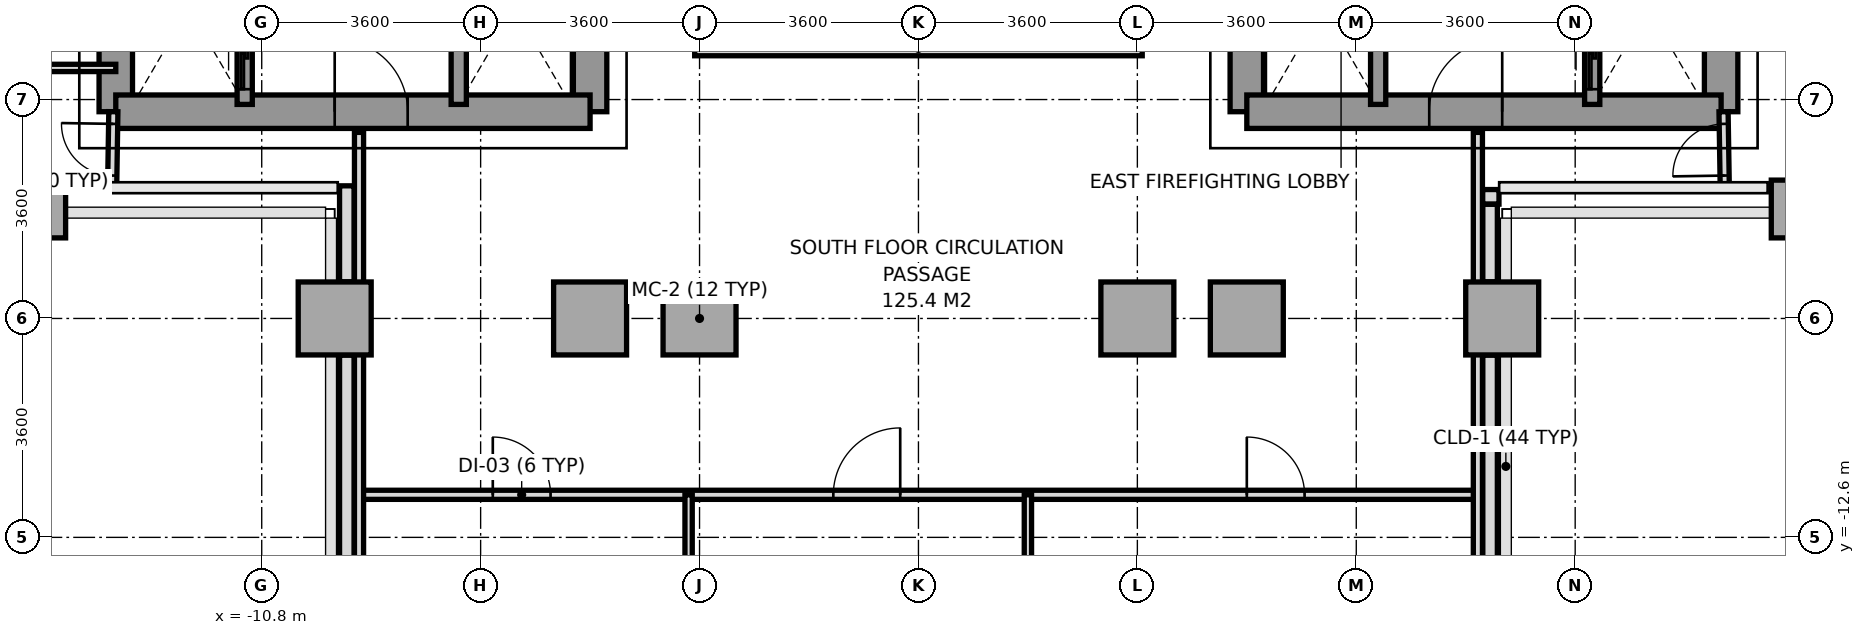
"""IFC4 building model, lengths in metres.
Left out: names, types, materials, properties, quantities, classifications, styles, units other than length and angle.
Written with IfcOpenShell. Run it as: python <this file> out.ifc"""

import sys

from ifc_helpers import new_model, si_unit, direction, frame, frame_2d, origin, origin_2d, place, context, subcontext, project, spatial, rectangle, extrude, source, transform, mapped, element, fill, save


model = new_model("IFC4")
c1 = context("Model", 3, precision=1e-05, world=origin(), true_north=direction((0.0, 1.0)))
c2 = subcontext(c1, "Body", "Model", "MODEL_VIEW")
j1 = project(units=[si_unit("LENGTHUNIT", "METRE"), si_unit("PLANEANGLEUNIT", "RADIAN")], contexts=[c1])
p1 = place(None, origin())
s1 = spatial("IfcSite", under=j1, at=p1, CompositionType="ELEMENT")
p2 = place(p1, origin())
s2 = spatial("IfcBuilding", under=s1, at=p2, CompositionType="ELEMENT")
p3 = place(p2, frame((0.0, 0.0, 57.8)))
s3 = spatial("IfcBuildingStorey", under=s2, at=p3, CompositionType="ELEMENT", Elevation=57.8)
m1 = source(origin(), c2, "Body", "SweptSolid", [
    extrude(rectangle(XDim=0.75, YDim=0.95, at=origin_2d()), origin(), (0.0, 0.0, 1.0), 3.2),
])
p4 = place(p3, frame((-14.4, -7.2, 0.0), z_axis=(0.0, 0.0, 1.0), x_axis=(1.0, 0.0, 0.0)))
e1 = element("IfcColumn", 1, at=p4, inside=s3, PredefinedType="COLUMN", context=c2, shape_type="MappedRepresentation", body=[
    mapped(m1, transform((0.0, 0.0, 0.0), x_axis=(1.0, 0.0, 0.0), y_axis=(0.0, 1.0, 0.0), z_axis=(0.0, 0.0, 1.0), scale=1.0)),
])
m2 = source(origin(), c2, "Body", "SweptSolid", [
    extrude(rectangle(XDim=1.2, YDim=1.2, at=origin_2d()), origin(), (0.0, 0.0, 1.0), 3.2),
])
for number, where, z_axis, x_axis in (
    (2, (-9.6, -9.0, 0.0), (0.0, 0.0, 1.0), (1.0, 0.0, 0.0)),
    (3, (-5.4, -9.0, 0.0), (0.0, 0.0, 1.0), (1.0, 0.0, 0.0)),
    (4, (-3.6, -9.0, 0.0), (0.0, 0.0, 1.0), (1.0, 0.0, 0.0)),
    (5, (3.6, -9.0, 0.0), (0.0, 0.0, 1.0), (1.0, 0.0, 0.0)),
    (6, (5.4, -9.0, 0.0), (0.0, 0.0, 1.0), (1.0, 0.0, 0.0)),
    (7, (9.6, -9.0, 0.0), (0.0, 0.0, 1.0), (1.0, 0.0, 0.0)),
):
    element("IfcColumn", number, at=place(p3, frame(where, z_axis=z_axis, x_axis=x_axis)), inside=s3, PredefinedType="COLUMN", context=c2, shape_type="MappedRepresentation", body=[
        mapped(m2, transform((0.0, 0.0, 0.0), x_axis=(1.0, 0.0, 0.0), y_axis=(0.0, 1.0, 0.0), z_axis=(0.0, 0.0, 1.0), scale=1.0)),
    ])
p5 = place(p3, frame((14.4, -7.2, 0.0), z_axis=(0.0, 0.0, 1.0), x_axis=(1.0, 0.0, 0.0)))
e8 = element("IfcColumn", 8, at=p5, inside=s3, PredefinedType="COLUMN", context=c2, shape_type="MappedRepresentation", body=[
    mapped(m1, transform((0.0, 0.0, 0.0), x_axis=(1.0, 0.0, 0.0), y_axis=(0.0, 1.0, 0.0), z_axis=(0.0, 0.0, 1.0), scale=1.0)),
])
p6 = place(p3, frame((9.547, -7.0, 0.0), z_axis=(0.0, 0.0, 1.0), x_axis=(-1.0, 0.0, 0.0)))
e9 = element("IfcWall", 9, at=p6, inside=s3, PredefinedType="PARAPET", context=c2, shape_type="SweptSolid", body=[
    extrude(rectangle(XDim=0.269, YDim=0.24, at=frame_2d((0.135, 0.0))), origin(), (0.0, 0.0, 1.0), 1.15),
])
p7 = place(p3, frame((9.4, -7.123, 0.0), z_axis=(0.0, 0.0, 1.0), x_axis=(0.0, -1.0, 0.0)))
e10 = element("IfcWall", 10, at=p7, inside=s3, PredefinedType="PARAPET", context=c2, shape_type="SweptSolid", body=[
    extrude(rectangle(XDim=1.274, YDim=0.24, at=frame_2d((0.637, 0.0))), origin(), (0.0, 0.0, 1.0), 1.15),
])
p8 = place(p3, frame((9.4, -9.603, 0.0), z_axis=(0.0, 0.0, 1.0), x_axis=(0.0, -1.0, 0.0)))
e11 = element("IfcWall", 11, at=p8, inside=s3, PredefinedType="PARAPET", context=c2, shape_type="SweptSolid", body=[
    extrude(rectangle(XDim=6.0, YDim=0.24, at=frame_2d((3.0, 0.0))), origin(), (0.0, 0.0, 1.0), 1.15),
])
p9 = place(p3, frame((-9.4, -15.358, 0.0), z_axis=(0.0, 0.0, 1.0), x_axis=(0.0, 1.0, 0.0)))
e12 = element("IfcWall", 12, at=p9, inside=s3, PredefinedType="PARAPET", context=c2, shape_type="SweptSolid", body=[
    extrude(rectangle(XDim=5.755, YDim=0.24, at=frame_2d((2.877, 0.0))), origin(), (0.0, 0.0, 1.0), 1.15),
])
p10 = place(p3, frame((-9.4, -8.397, 0.0), z_axis=(0.0, 0.0, 1.0), x_axis=(0.0, 1.0, 0.0)))
e13 = element("IfcWall", 13, at=p10, inside=s3, PredefinedType="PARAPET", context=c2, shape_type="SweptSolid", body=[
    extrude(rectangle(XDim=1.578, YDim=0.24, at=frame_2d((0.789, 0.0))), origin(), (0.0, 0.0, 1.0), 1.15),
])
p11 = place(p3, frame((-13.2, -5.6, 0.0), z_axis=(0.0, 0.0, 1.0), x_axis=(0.0, 1.0, 0.0)))
e14 = element("IfcWall", 14, at=p11, inside=s3, PredefinedType="SHEAR", context=c2, shape_type="SweptSolid", body=[
    extrude(rectangle(XDim=11.2, YDim=0.55, at=frame_2d((5.6, 0.0))), origin(), (0.0, 0.0, 1.0), 3.2),
])
p12 = place(p3, frame((-5.4, -5.6, 0.0), z_axis=(0.0, 0.0, 1.0), x_axis=(0.0, 1.0, 0.0)))
e15 = element("IfcWall", 15, at=p12, inside=s3, PredefinedType="SHEAR", context=c2, shape_type="SweptSolid", body=[
    extrude(rectangle(XDim=12.5, YDim=0.55, at=frame_2d((6.25, 0.0))), origin(), (0.0, 0.0, 1.0), 3.2),
])
p13 = place(p12, frame((4.55, 0.0, 0.0)))
e16 = element("IfcOpeningElement", 16, at=p13, cuts=e15, PredefinedType="OPENING", context=c2, shape_type="SweptSolid", body=[
    extrude(rectangle(XDim=1.2, YDim=2.2, at=frame_2d((0.6, 1.1))), frame((0.0, 0.285, 0.0), z_axis=(0.0, -1.0, 0.0), x_axis=(1.0, 0.0, 0.0)), (0.0, 0.0, 1.0), 0.57),
])
p14 = place(p12, frame((6.86, 0.0, 0.0)))
e17 = element("IfcOpeningElement", 17, at=p14, cuts=e15, PredefinedType="OPENING", context=c2, shape_type="SweptSolid", body=[
    extrude(rectangle(XDim=0.8, YDim=2.1, at=frame_2d((0.4, 1.05))), frame((0.0, 0.285, 0.0), z_axis=(0.0, -1.0, 0.0), x_axis=(1.0, 0.0, 0.0)), (0.0, 0.0, 1.0), 0.57),
])
p15 = place(p3, frame((-13.2, -5.6, 0.0), z_axis=(0.0, 0.0, 1.0), x_axis=(1.0, 0.0, 0.0)))
e18 = element("IfcWall", 18, at=p15, inside=s3, PredefinedType="SHEAR", context=c2, shape_type="SweptSolid", body=[
    extrude(rectangle(XDim=7.8, YDim=0.55, at=frame_2d((3.9, 0.0))), origin(), (0.0, 0.0, 1.0), 3.2),
])
p16 = place(p15, frame((3.6, 0.0, 0.0)))
e19 = element("IfcOpeningElement", 19, at=p16, cuts=e18, PredefinedType="OPENING", context=c2, shape_type="SweptSolid", body=[
    extrude(rectangle(XDim=1.2, YDim=2.2, at=frame_2d((0.6, 1.1))), frame((0.0, 0.285, 0.0), z_axis=(0.0, -1.0, 0.0), x_axis=(1.0, 0.0, 0.0)), (0.0, 0.0, 1.0), 0.57),
])
p17 = place(p3, frame((13.2, -5.6, 0.0), z_axis=(0.0, 0.0, 1.0), x_axis=(0.0, 1.0, 0.0)))
e20 = element("IfcWall", 20, at=p17, inside=s3, PredefinedType="SHEAR", context=c2, shape_type="SweptSolid", body=[
    extrude(rectangle(XDim=11.2, YDim=0.55, at=frame_2d((5.6, 0.0))), origin(), (0.0, 0.0, 1.0), 3.2),
])
p18 = place(p3, frame((5.4, -5.6, 0.0), z_axis=(0.0, 0.0, 1.0), x_axis=(0.0, 1.0, 0.0)))
e21 = element("IfcWall", 21, at=p18, inside=s3, PredefinedType="SHEAR", context=c2, shape_type="SweptSolid", body=[
    extrude(rectangle(XDim=12.5, YDim=0.55, at=frame_2d((6.25, 0.0))), origin(), (0.0, 0.0, 1.0), 3.2),
])
p19 = place(p18, frame((4.55, 0.0, 0.0)))
e22 = element("IfcOpeningElement", 22, at=p19, cuts=e21, PredefinedType="OPENING", context=c2, shape_type="SweptSolid", body=[
    extrude(rectangle(XDim=1.2, YDim=2.2, at=frame_2d((0.6, 1.1))), frame((0.0, 0.285, 0.0), z_axis=(0.0, -1.0, 0.0), x_axis=(1.0, 0.0, 0.0)), (0.0, 0.0, 1.0), 0.57),
])
p20 = place(p18, frame((6.86, 0.0, 0.0)))
e23 = element("IfcOpeningElement", 23, at=p20, cuts=e21, PredefinedType="OPENING", context=c2, shape_type="SweptSolid", body=[
    extrude(rectangle(XDim=0.8, YDim=2.1, at=frame_2d((0.4, 1.05))), frame((0.0, 0.285, 0.0), z_axis=(0.0, -1.0, 0.0), x_axis=(1.0, 0.0, 0.0)), (0.0, 0.0, 1.0), 0.57),
])
p21 = place(p18, frame((7.88, 0.0, 0.0)))
e24 = element("IfcOpeningElement", 24, at=p21, cuts=e21, PredefinedType="OPENING", context=c2, shape_type="SweptSolid", body=[
    extrude(rectangle(XDim=0.8, YDim=2.1, at=frame_2d((0.4, 1.05))), frame((0.0, 0.285, 0.0), z_axis=(0.0, -1.0, 0.0), x_axis=(1.0, 0.0, 0.0)), (0.0, 0.0, 1.0), 0.57),
])
p22 = place(p3, frame((5.4, -5.6, 0.0), z_axis=(0.0, 0.0, 1.0), x_axis=(1.0, 0.0, 0.0)))
e25 = element("IfcWall", 25, at=p22, inside=s3, PredefinedType="SHEAR", context=c2, shape_type="SweptSolid", body=[
    extrude(rectangle(XDim=7.8, YDim=0.55, at=frame_2d((3.9, 0.0))), origin(), (0.0, 0.0, 1.0), 3.2),
])
p23 = place(p22, frame((3.0, 0.0, 0.0)))
e26 = element("IfcOpeningElement", 26, at=p23, cuts=e25, PredefinedType="OPENING", context=c2, shape_type="SweptSolid", body=[
    extrude(rectangle(XDim=1.2, YDim=2.2, at=frame_2d((0.6, 1.1))), frame((0.0, 0.285, 0.0), z_axis=(0.0, -1.0, 0.0), x_axis=(1.0, 0.0, 0.0)), (0.0, 0.0, 1.0), 0.57),
])
p24 = place(p3, frame((-11.08, -5.48, 0.0), z_axis=(0.0, 0.0, 1.0), x_axis=(0.0, 1.0, 0.0)))
e27 = element("IfcWall", 27, at=p24, inside=s3, PredefinedType="SOLIDWALL", context=c2, shape_type="SweptSolid", body=[
    extrude(rectangle(XDim=1.6, YDim=0.25, at=frame_2d((0.8, 0.0))), origin(), (0.0, 0.0, 1.0), 3.2),
])
p25 = place(p24, frame((0.25, 0.0, 0.0)))
e28 = element("IfcOpeningElement", 28, at=p25, cuts=e27, PredefinedType="OPENING", context=c2, shape_type="SweptSolid", body=[
    extrude(rectangle(XDim=1.1, YDim=2.2, at=frame_2d((0.55, 1.1))), frame((0.0, 0.135, 0.0), z_axis=(0.0, -1.0, 0.0), x_axis=(1.0, 0.0, 0.0)), (0.0, 0.0, 1.0), 0.27),
])
p26 = place(p3, frame((11.08, -5.48, 0.0), z_axis=(0.0, 0.0, 1.0), x_axis=(0.0, 1.0, 0.0)))
e29 = element("IfcWall", 29, at=p26, inside=s3, PredefinedType="SOLIDWALL", context=c2, shape_type="SweptSolid", body=[
    extrude(rectangle(XDim=1.6, YDim=0.25, at=frame_2d((0.8, 0.0))), origin(), (0.0, 0.0, 1.0), 3.2),
])
p27 = place(p26, frame((0.25, 0.0, 0.0)))
e30 = element("IfcOpeningElement", 30, at=p27, cuts=e29, PredefinedType="OPENING", context=c2, shape_type="SweptSolid", body=[
    extrude(rectangle(XDim=1.1, YDim=2.2, at=frame_2d((0.55, 1.1))), frame((0.0, 0.135, 0.0), z_axis=(0.0, -1.0, 0.0), x_axis=(1.0, 0.0, 0.0)), (0.0, 0.0, 1.0), 0.27),
])
for number, where, z_axis, x_axis in (
    (31, (-7.56, -5.48, 0.0), (0.0, 0.0, 1.0), (0.0, 1.0, 0.0)),
    (32, (7.56, -5.48, 0.0), (0.0, 0.0, 1.0), (0.0, 1.0, 0.0)),
):
    element("IfcWall", number, at=place(p3, frame(where, z_axis=z_axis, x_axis=x_axis)), inside=s3, PredefinedType="SOLIDWALL", context=c2, shape_type="SweptSolid", body=[
        extrude(rectangle(XDim=1.6, YDim=0.25, at=frame_2d((0.8, 0.0))), origin(), (0.0, 0.0, 1.0), 3.2),
    ])
p28 = place(p3, frame((-9.2, -11.9, 0.0), z_axis=(0.0, 0.0, 1.0), x_axis=(1.0, 0.0, 0.0)))
e33 = element("IfcWall", 33, at=p28, inside=s3, PredefinedType="PARTITIONING", context=c2, shape_type="SweptSolid", body=[
    extrude(rectangle(XDim=18.4, YDim=0.15, at=frame_2d((9.2, 0.0))), origin(), (0.0, 0.0, 1.0), 3.2),
])
p29 = place(p28, frame((2.2, 0.0, 0.0)))
e34 = element("IfcOpeningElement", 34, at=p29, cuts=e33, PredefinedType="OPENING", context=c2, shape_type="SweptSolid", body=[
    extrude(rectangle(XDim=0.95, YDim=2.15, at=frame_2d((0.475, 1.075))), frame((0.0, 0.085, 0.0), z_axis=(0.0, -1.0, 0.0), x_axis=(1.0, 0.0, 0.0)), (0.0, 0.0, 1.0), 0.17),
])
p30 = place(p28, frame((7.8, 0.0, 0.0)))
e35 = element("IfcOpeningElement", 35, at=p30, cuts=e33, PredefinedType="OPENING", context=c2, shape_type="SweptSolid", body=[
    extrude(rectangle(XDim=1.1, YDim=2.2, at=frame_2d((0.55, 1.1))), frame((0.0, 0.085, 0.0), z_axis=(0.0, -1.0, 0.0), x_axis=(1.0, 0.0, 0.0)), (0.0, 0.0, 1.0), 0.17),
])
p31 = place(p28, frame((14.6, 0.0, 0.0)))
e36 = element("IfcOpeningElement", 36, at=p31, cuts=e33, PredefinedType="OPENING", context=c2, shape_type="SweptSolid", body=[
    extrude(rectangle(XDim=0.95, YDim=2.15, at=frame_2d((0.475, 1.075))), frame((0.0, 0.085, 0.0), z_axis=(0.0, -1.0, 0.0), x_axis=(1.0, 0.0, 0.0)), (0.0, 0.0, 1.0), 0.17),
])
for number, where, z_axis, x_axis in (
    (37, (-9.2, -15.68, 0.0), (0.0, 0.0, 1.0), (0.0, 1.0, 0.0)),
    (38, (9.2, -15.68, 0.0), (0.0, 0.0, 1.0), (0.0, 1.0, 0.0)),
):
    element("IfcWall", number, at=place(p3, frame(where, z_axis=z_axis, x_axis=x_axis)), inside=s3, PredefinedType="PARTITIONING", context=c2, shape_type="SweptSolid", body=[
        extrude(rectangle(XDim=9.74, YDim=0.15, at=frame_2d((4.87, 0.0))), origin(), (0.0, 0.0, 1.0), 2.65),
    ])
for number, where, z_axis, x_axis in (
    (39, (-3.78, -24.65, 0.0), (0.0, 0.0, 1.0), (0.0, 1.0, 0.0)),
    (40, (1.8, -24.65, 0.0), (0.0, 0.0, 1.0), (0.0, 1.0, 0.0)),
):
    element("IfcWall", number, at=place(p3, frame(where, z_axis=z_axis, x_axis=x_axis)), inside=s3, PredefinedType="PARTITIONING", context=c2, shape_type="SweptSolid", body=[
        extrude(rectangle(XDim=12.75, YDim=0.12, at=frame_2d((6.375, 0.0))), origin(), (0.0, 0.0, 1.0), 2.65),
    ])
p32 = place(p3, frame((-13.26, -6.85, 0.0), z_axis=(0.0, 0.0, 1.0), x_axis=(0.016013571389, 0.999871774545, 0.0)))
e41 = element("IfcWall", 41, at=p32, inside=s3, PredefinedType="PARTITIONING", context=c2, shape_type="SweptSolid", body=[
    extrude(rectangle(XDim=1.25, YDim=0.15, at=frame_2d((0.625, 0.0))), origin(), (0.0, 0.0, 1.0), 3.2),
])
p33 = place(p32, frame((0.2, 0.0, 0.0)))
e42 = element("IfcOpeningElement", 42, at=p33, cuts=e41, PredefinedType="OPENING", context=c2, shape_type="SweptSolid", body=[
    extrude(rectangle(XDim=0.85, YDim=2.1, at=frame_2d((0.425, 1.05))), frame((0.0, 0.085, 0.0), z_axis=(0.0, -1.0, 0.0), x_axis=(1.0, 0.0, 0.0)), (0.0, 0.0, 1.0), 0.17),
])
p34 = place(p3, frame((-24.57, -4.88, 0.0), z_axis=(0.0, 0.0, 1.0), x_axis=(1.0, 0.0, 0.0)))
e43 = element("IfcWall", 43, at=p34, inside=s3, PredefinedType="PARTITIONING", context=c2, shape_type="SweptSolid", body=[
    extrude(rectangle(XDim=11.37, YDim=0.12, at=frame_2d((5.685, 0.0))), origin(), (0.0, 0.0, 1.0), 2.7),
])
p35 = place(p34, frame((2.2, 0.0, 0.0)))
e44 = element("IfcOpeningElement", 44, at=p35, cuts=e43, PredefinedType="OPENING", context=c2, shape_type="SweptSolid", body=[
    extrude(rectangle(XDim=0.95, YDim=2.15, at=frame_2d((0.475, 1.075))), frame((0.0, 0.07, 0.0), z_axis=(0.0, -1.0, 0.0), x_axis=(1.0, 0.0, 0.0)), (0.0, 0.0, 1.0), 0.14),
])
p36 = place(p3, frame((13.26, -6.85, 0.0), z_axis=(0.0, 0.0, 1.0), x_axis=(-0.016013571389, 0.999871774545, 0.0)))
e45 = element("IfcWall", 45, at=p36, inside=s3, PredefinedType="PARTITIONING", context=c2, shape_type="SweptSolid", body=[
    extrude(rectangle(XDim=1.25, YDim=0.15, at=frame_2d((0.625, 0.0))), origin(), (0.0, 0.0, 1.0), 3.2),
])
p37 = place(p36, frame((0.2, 0.0, 0.0)))
e46 = element("IfcOpeningElement", 46, at=p37, cuts=e45, PredefinedType="OPENING", context=c2, shape_type="SweptSolid", body=[
    extrude(rectangle(XDim=0.85, YDim=2.1, at=frame_2d((0.425, 1.05))), frame((0.0, 0.085, 0.0), z_axis=(0.0, -1.0, 0.0), x_axis=(1.0, 0.0, 0.0)), (0.0, 0.0, 1.0), 0.17),
])
p38 = place(p3, frame((-3.68, -4.56, 0.0), z_axis=(0.0, 0.0, 1.0), x_axis=(1.0, 0.0, 0.0)))
e47 = element("IfcWall", 47, at=p38, inside=s3, PredefinedType="PARAPET", context=c2, shape_type="SweptSolid", body=[
    extrude(rectangle(XDim=7.36, YDim=0.24, at=frame_2d((3.68, 0.0))), origin(), (0.0, 0.0, 1.0), 1.15),
])
m3 = source(origin(), c2, "Body", "SweptSolid", [
    extrude(rectangle(XDim=1.2, YDim=2.2, at=frame_2d((0.6, 1.1))), frame((0.0, 0.025, 0.0), z_axis=(0.0, -1.0, 0.0), x_axis=(1.0, 0.0, 0.0)), (0.0, 0.0, 1.0), 0.05),
])
p39 = place(p16, origin())
e48 = element("IfcDoor", 48, at=p39, inside=s3, OperationType="SINGLE_SWING_LEFT", PredefinedType="DOOR", context=c2, shape_type="MappedRepresentation", body=[
    mapped(m3, transform((0.0, 0.0, 0.0), x_axis=(1.0, 0.0, 0.0), y_axis=(0.0, 1.0, 0.0), z_axis=(0.0, 0.0, 1.0), scale=1.0)),
])
fill(e19, e48)
p40 = place(p23, origin())
e49 = element("IfcDoor", 49, at=p40, inside=s3, OperationType="SINGLE_SWING_RIGHT", PredefinedType="DOOR", context=c2, shape_type="MappedRepresentation", body=[
    mapped(m3, transform((0.0, 0.0, 0.0), x_axis=(1.0, 0.0, 0.0), y_axis=(0.0, 1.0, 0.0), z_axis=(0.0, 0.0, 1.0), scale=1.0)),
])
fill(e26, e49)
m4 = source(origin(), c2, "Body", "SweptSolid", [
    extrude(rectangle(XDim=1.1, YDim=2.2, at=frame_2d((0.55, 1.1))), frame((0.0, 0.025, 0.0), z_axis=(0.0, -1.0, 0.0), x_axis=(1.0, 0.0, 0.0)), (0.0, 0.0, 1.0), 0.05),
])
p41 = place(p25, origin())
e50 = element("IfcDoor", 50, at=p41, inside=s3, OperationType="SLIDING_TO_LEFT", PredefinedType="DOOR", context=c2, shape_type="MappedRepresentation", body=[
    mapped(m4, transform((0.0, 0.0, 0.0), x_axis=(1.0, 0.0, 0.0), y_axis=(0.0, 1.0, 0.0), z_axis=(0.0, 0.0, 1.0), scale=1.0)),
])
fill(e28, e50)
p42 = place(p27, origin())
e51 = element("IfcDoor", 51, at=p42, inside=s3, OperationType="SLIDING_TO_LEFT", PredefinedType="DOOR", context=c2, shape_type="MappedRepresentation", body=[
    mapped(m4, transform((0.0, 0.0, 0.0), x_axis=(1.0, 0.0, 0.0), y_axis=(0.0, 1.0, 0.0), z_axis=(0.0, 0.0, 1.0), scale=1.0)),
])
fill(e30, e51)
m5 = source(origin(), c2, "Body", "SweptSolid", [
    extrude(rectangle(XDim=0.95, YDim=2.15, at=frame_2d((0.475, 1.075))), frame((0.0, 0.025, 0.0), z_axis=(0.0, -1.0, 0.0), x_axis=(1.0, 0.0, 0.0)), (0.0, 0.0, 1.0), 0.05),
])
p43 = place(p29, origin())
e52 = element("IfcDoor", 52, at=p43, inside=s3, OperationType="SINGLE_SWING_LEFT", PredefinedType="DOOR", context=c2, shape_type="MappedRepresentation", body=[
    mapped(m5, transform((0.0, 0.0, 0.0), x_axis=(1.0, 0.0, 0.0), y_axis=(0.0, 1.0, 0.0), z_axis=(0.0, 0.0, 1.0), scale=1.0)),
])
fill(e34, e52)
p44 = place(p30, origin())
e53 = element("IfcDoor", 53, at=p44, inside=s3, OperationType="SINGLE_SWING_RIGHT", PredefinedType="DOOR", context=c2, shape_type="MappedRepresentation", body=[
    mapped(m4, transform((0.0, 0.0, 0.0), x_axis=(1.0, 0.0, 0.0), y_axis=(0.0, 1.0, 0.0), z_axis=(0.0, 0.0, 1.0), scale=1.0)),
])
fill(e35, e53)
p45 = place(p31, origin())
e54 = element("IfcDoor", 54, at=p45, inside=s3, OperationType="SINGLE_SWING_LEFT", PredefinedType="DOOR", context=c2, shape_type="MappedRepresentation", body=[
    mapped(m5, transform((0.0, 0.0, 0.0), x_axis=(1.0, 0.0, 0.0), y_axis=(0.0, 1.0, 0.0), z_axis=(0.0, 0.0, 1.0), scale=1.0)),
])
fill(e36, e54)
m6 = source(origin(), c2, "Body", "SweptSolid", [
    extrude(rectangle(XDim=0.85, YDim=2.1, at=frame_2d((0.425, 1.05))), frame((0.0, 0.025, 0.0), z_axis=(0.0, -1.0, 0.0), x_axis=(1.0, 0.0, 0.0)), (0.0, 0.0, 1.0), 0.05),
])
p46 = place(p33, origin())
e55 = element("IfcDoor", 55, at=p46, inside=s3, OperationType="SINGLE_SWING_RIGHT", PredefinedType="DOOR", context=c2, shape_type="MappedRepresentation", body=[
    mapped(m6, transform((0.0, 0.0, 0.0), x_axis=(1.0, 0.0, 0.0), y_axis=(0.0, 1.0, 0.0), z_axis=(0.0, 0.0, 1.0), scale=1.0)),
])
fill(e42, e55)
p47 = place(p37, origin())
e56 = element("IfcDoor", 56, at=p47, inside=s3, OperationType="SINGLE_SWING_LEFT", PredefinedType="DOOR", context=c2, shape_type="MappedRepresentation", body=[
    mapped(m6, transform((0.0, 0.0, 0.0), x_axis=(1.0, 0.0, 0.0), y_axis=(0.0, 1.0, 0.0), z_axis=(0.0, 0.0, 1.0), scale=1.0)),
])
fill(e46, e56)
save(model, sys.argv[1])
